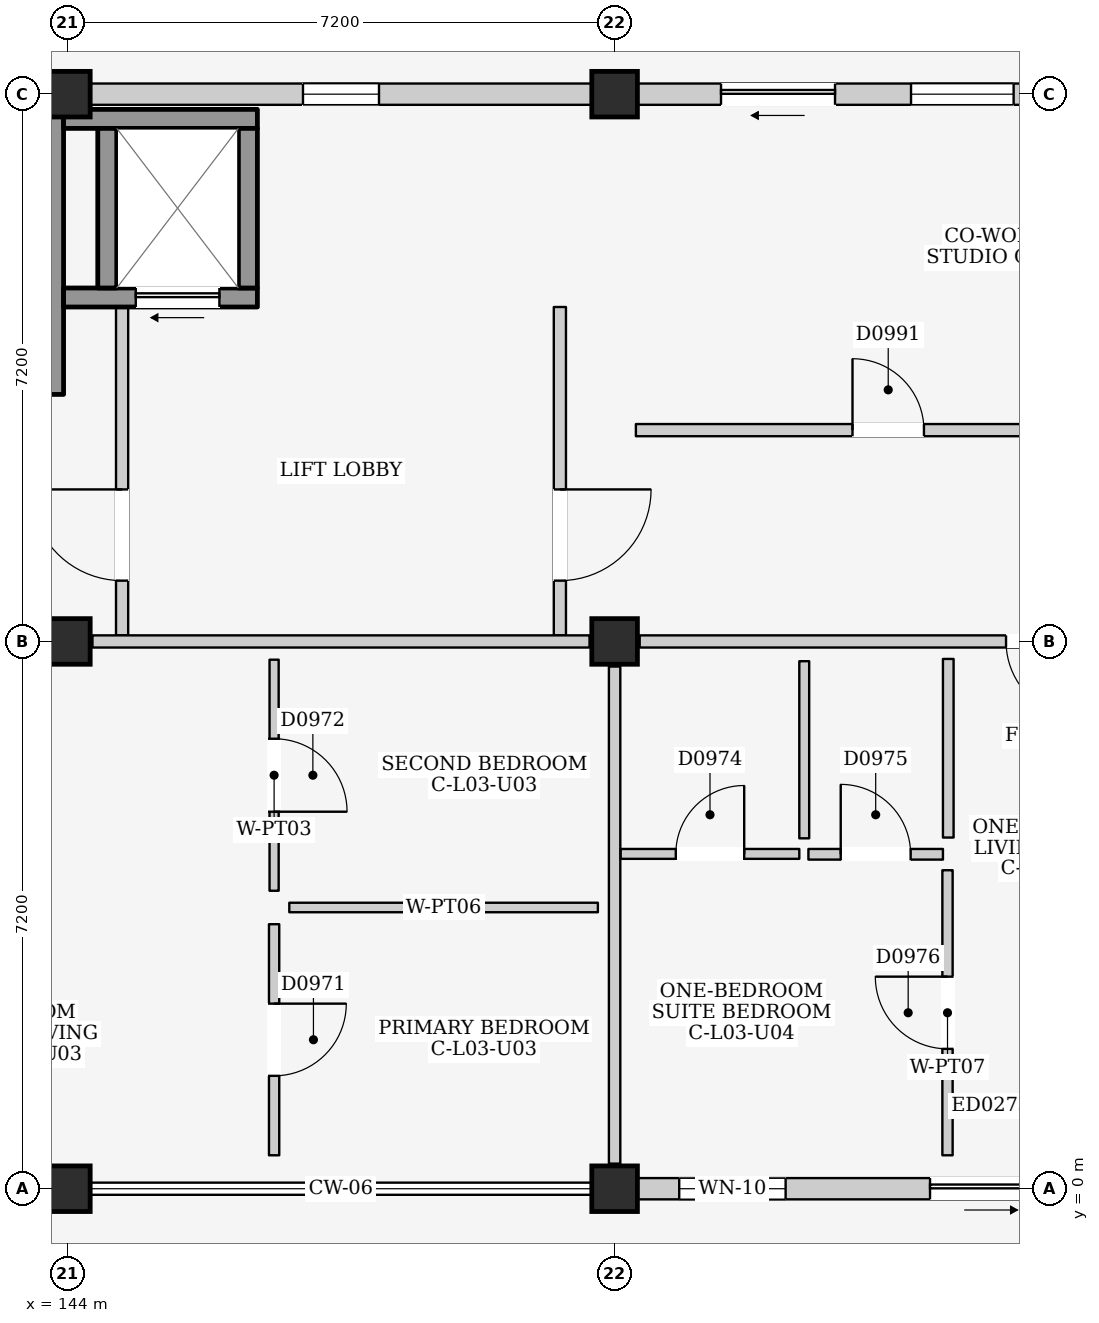
"""IFC4 building model, lengths in metres.
Left out: names, types, materials, properties, quantities, classifications, styles, units other than length and angle.
Written with IfcOpenShell. Run it as: python <this file> out.ifc"""

import sys

from ifc_helpers import new_model, si_unit, direction, frame, frame_2d, origin, origin_2d, place, context, subcontext, project, spatial, rectangle, extrude, element, fill, save


model = new_model("IFC4")
c1 = context("Model", 3, precision=1e-05, world=origin(), true_north=direction((0.0, 1.0)))
c2 = subcontext(c1, "Body", "Model", "MODEL_VIEW")
j1 = project(units=[si_unit("LENGTHUNIT", "METRE"), si_unit("PLANEANGLEUNIT", "RADIAN")], contexts=[c1])
p1 = place(None, origin())
s1 = spatial("IfcSite", under=j1, at=p1, CompositionType="ELEMENT")
p2 = place(p1, origin())
s2 = spatial("IfcBuilding", under=s1, at=p2, CompositionType="ELEMENT")
p3 = place(p2, frame((0.0, 0.0, 12.2)))
s3 = spatial("IfcBuildingStorey", under=s2, at=p3, CompositionType="ELEMENT", Elevation=12.2)
for number, where, z_axis, x_axis in (
    (1, (144.0, 0.0, 0.0), (0.0, 0.0, 1.0), (1.0, 0.0, 0.0)),
    (2, (144.0, 7.2, 0.0), (0.0, 0.0, 1.0), (1.0, 0.0, 0.0)),
    (3, (144.0, 14.4, 0.0), (0.0, 0.0, 1.0), (1.0, 0.0, 0.0)),
    (4, (151.2, 0.0, 0.0), (0.0, 0.0, 1.0), (1.0, 0.0, 0.0)),
    (5, (151.2, 7.2, 0.0), (0.0, 0.0, 1.0), (1.0, 0.0, 0.0)),
    (6, (151.2, 14.4, 0.0), (0.0, 0.0, 1.0), (1.0, 0.0, 0.0)),
):
    element("IfcColumn", number, at=place(p3, frame(where, z_axis=z_axis, x_axis=x_axis)), inside=s3, PredefinedType="COLUMN", context=c2, shape_type="SweptSolid", body=[
        extrude(rectangle(XDim=0.6, YDim=0.6, at=origin_2d()), origin(), (0.0, 0.0, 1.0), 3.2),
    ])
p4 = place(p3, frame((144.3, 14.4, 0.0), z_axis=(0.0, 0.0, 1.0), x_axis=(1.0, 0.0, 0.0)))
e7 = element("IfcWall", 7, at=p4, inside=s3, PredefinedType="ELEMENTEDWALL", context=c2, shape_type="SweptSolid", body=[
    extrude(rectangle(XDim=6.6, YDim=0.28, at=frame_2d((3.3, 0.0))), origin(), (0.0, 0.0, 1.0), 2.365),
])
p5 = place(p4, frame((2.8, 0.0, 1.2)))
e8 = element("IfcOpeningElement", 8, at=p5, cuts=e7, PredefinedType="OPENING", context=c2, shape_type="SweptSolid", body=[
    extrude(rectangle(XDim=1.0, YDim=0.9, at=frame_2d((0.5, 0.45))), frame((0.0, 0.155, 0.0), z_axis=(0.0, -1.0, 0.0), x_axis=(1.0, 0.0, 0.0)), (0.0, 0.0, 1.0), 0.31),
])
p6 = place(p3, frame((151.5, 0.0, 0.0), z_axis=(0.0, 0.0, 1.0), x_axis=(1.0, 0.0, 0.0)))
e9 = element("IfcWall", 9, at=p6, inside=s3, PredefinedType="ELEMENTEDWALL", context=c2, shape_type="SweptSolid", body=[
    extrude(rectangle(XDim=6.6, YDim=0.28, at=frame_2d((3.3, 0.0))), origin(), (0.0, 0.0, 1.0), 2.445),
])
p7 = place(p6, frame((3.85, 0.0, 0.0)))
e10 = element("IfcOpeningElement", 10, at=p7, cuts=e9, PredefinedType="OPENING", context=c2, shape_type="SweptSolid", body=[
    extrude(rectangle(XDim=1.6, YDim=2.12, at=frame_2d((0.8, 1.06))), frame((0.0, 0.155, 0.0), z_axis=(0.0, -1.0, 0.0), x_axis=(1.0, 0.0, 0.0)), (0.0, 0.0, 1.0), 0.31),
])
p8 = place(p6, frame((0.55, 0.0, 0.9)))
e11 = element("IfcOpeningElement", 11, at=p8, cuts=e9, PredefinedType="OPENING", context=c2, shape_type="SweptSolid", body=[
    extrude(rectangle(XDim=1.4, YDim=1.2, at=frame_2d((0.7, 0.6))), frame((0.0, 0.155, 0.0), z_axis=(0.0, -1.0, 0.0), x_axis=(1.0, 0.0, 0.0)), (0.0, 0.0, 1.0), 0.31),
])
p9 = place(p3, frame((151.5, 14.4, 0.0), z_axis=(0.0, 0.0, 1.0), x_axis=(1.0, 0.0, 0.0)))
e12 = element("IfcWall", 12, at=p9, inside=s3, PredefinedType="ELEMENTEDWALL", context=c2, shape_type="SweptSolid", body=[
    extrude(rectangle(XDim=6.6, YDim=0.28, at=frame_2d((3.3, 0.0))), origin(), (0.0, 0.0, 1.0), 2.365),
])
p10 = place(p9, frame((1.1, 0.0, 0.0)))
e13 = element("IfcOpeningElement", 13, at=p10, cuts=e12, PredefinedType="OPENING", context=c2, shape_type="SweptSolid", body=[
    extrude(rectangle(XDim=1.5, YDim=2.12, at=frame_2d((0.75, 1.06))), frame((0.0, 0.155, 0.0), z_axis=(0.0, -1.0, 0.0), x_axis=(1.0, 0.0, 0.0)), (0.0, 0.0, 1.0), 0.31),
])
p11 = place(p9, frame((3.6, 0.0, 0.755)))
e14 = element("IfcOpeningElement", 14, at=p11, cuts=e12, PredefinedType="OPENING", context=c2, shape_type="SweptSolid", body=[
    extrude(rectangle(XDim=1.35, YDim=1.5, at=frame_2d((0.675, 0.75))), frame((0.0, 0.155, 0.0), z_axis=(0.0, -1.0, 0.0), x_axis=(1.0, 0.0, 0.0)), (0.0, 0.0, 1.0), 0.31),
])
p12 = place(p3, frame((143.8, 10.45, 0.0), z_axis=(0.0, 0.0, 1.0), x_axis=(0.0, 1.0, 0.0)))
e15 = element("IfcWall", 15, at=p12, inside=s3, PredefinedType="SHEAR", context=c2, shape_type="SweptSolid", body=[
    extrude(rectangle(XDim=3.75, YDim=0.3, at=frame_2d((1.875, 0.0))), origin(), (0.0, 0.0, 1.0), 2.98),
])
p13 = place(p3, frame((144.72, 7.28, 0.0), z_axis=(0.0, 0.0, 1.0), x_axis=(0.0, 1.0, 0.0)))
e16 = element("IfcWall", 16, at=p13, inside=s3, PredefinedType="PARTITIONING", context=c2, shape_type="SweptSolid", body=[
    extrude(rectangle(XDim=4.32, YDim=0.16, at=frame_2d((2.16, 0.0))), origin(), (0.0, 0.0, 1.0), 2.98),
])
p14 = place(p13, frame((0.72, 0.0, 0.0)))
e17 = element("IfcOpeningElement", 17, at=p14, cuts=e16, PredefinedType="OPENING", context=c2, shape_type="SweptSolid", body=[
    extrude(rectangle(XDim=1.2, YDim=2.2, at=frame_2d((0.6, 1.1))), frame((0.0, 0.095, 0.0), z_axis=(0.0, -1.0, 0.0), x_axis=(1.0, 0.0, 0.0)), (0.0, 0.0, 1.0), 0.19),
])
p15 = place(p3, frame((150.48, 7.28, 0.0), z_axis=(0.0, 0.0, 1.0), x_axis=(0.0, 1.0, 0.0)))
e18 = element("IfcWall", 18, at=p15, inside=s3, PredefinedType="PARTITIONING", context=c2, shape_type="SweptSolid", body=[
    extrude(rectangle(XDim=4.32, YDim=0.16, at=frame_2d((2.16, 0.0))), origin(), (0.0, 0.0, 1.0), 2.98),
])
p16 = place(p15, frame((0.72, 0.0, 0.0)))
e19 = element("IfcOpeningElement", 19, at=p16, cuts=e18, PredefinedType="OPENING", context=c2, shape_type="SweptSolid", body=[
    extrude(rectangle(XDim=1.2, YDim=2.2, at=frame_2d((0.6, 1.1))), frame((0.0, 0.095, 0.0), z_axis=(0.0, -1.0, 0.0), x_axis=(1.0, 0.0, 0.0)), (0.0, 0.0, 1.0), 0.19),
])
p17 = place(p3, frame((143.95, 11.725, 0.0), z_axis=(0.0, 0.0, 1.0), x_axis=(1.0, 0.0, 0.0)))
e20 = element("IfcWall", 20, at=p17, inside=s3, PredefinedType="SHEAR", context=c2, shape_type="SweptSolid", body=[
    extrude(rectangle(XDim=2.55, YDim=0.25, at=frame_2d((1.275, 0.0))), origin(), (0.0, 0.0, 1.0), 2.98),
])
p18 = place(p17, frame((0.95, 0.0, 0.0)))
e21 = element("IfcOpeningElement", 21, at=p18, cuts=e20, PredefinedType="OPENING", context=c2, shape_type="SweptSolid", body=[
    extrude(rectangle(XDim=1.1, YDim=2.15, at=frame_2d((0.55, 1.075))), frame((0.0, 0.14, 0.0), z_axis=(0.0, -1.0, 0.0), x_axis=(1.0, 0.0, 0.0)), (0.0, 0.0, 1.0), 0.28),
])
p19 = place(p3, frame((143.95, 14.075, 0.0), z_axis=(0.0, 0.0, 1.0), x_axis=(1.0, 0.0, 0.0)))
e22 = element("IfcWall", 22, at=p19, inside=s3, PredefinedType="SHEAR", context=c2, shape_type="SweptSolid", body=[
    extrude(rectangle(XDim=2.55, YDim=0.25, at=frame_2d((1.275, 0.0))), origin(), (0.0, 0.0, 1.0), 2.98),
])
for number, where, z_axis, x_axis in (
    (23, (144.525, 11.85, 0.0), (0.0, 0.0, 1.0), (0.0, 1.0, 0.0)),
    (24, (146.375, 11.85, 0.0), (0.0, 0.0, 1.0), (0.0, 1.0, 0.0)),
):
    element("IfcWall", number, at=place(p3, frame(where, z_axis=z_axis, x_axis=x_axis)), inside=s3, PredefinedType="SHEAR", context=c2, shape_type="SweptSolid", body=[
        extrude(rectangle(XDim=2.1, YDim=0.25, at=frame_2d((1.05, 0.0))), origin(), (0.0, 0.0, 1.0), 2.98),
    ])
p20 = place(p3, frame((144.33, 7.2, 0.0), z_axis=(0.0, 0.0, 1.0), x_axis=(1.0, 0.0, 0.0)))
e25 = element("IfcWall", 25, at=p20, inside=s3, PredefinedType="PARTITIONING", context=c2, shape_type="SweptSolid", body=[
    extrude(rectangle(XDim=6.54, YDim=0.16, at=frame_2d((3.27, 0.0))), origin(), (0.0, 0.0, 1.0), 2.365),
])
p21 = place(p3, frame((151.2, 0.33, 0.0), z_axis=(0.0, 0.0, 1.0), x_axis=(0.0, 1.0, 0.0)))
e26 = element("IfcWall", 26, at=p21, inside=s3, PredefinedType="PARTITIONING", context=c2, shape_type="SweptSolid", body=[
    extrude(rectangle(XDim=6.54, YDim=0.15, at=frame_2d((3.27, 0.0))), origin(), (0.0, 0.0, 1.0), 2.415),
])
p22 = place(p3, frame((146.72, 0.44, 0.0), z_axis=(0.0, 0.0, 1.0), x_axis=(0.0, 1.0, 0.0)))
e27 = element("IfcWall", 27, at=p22, inside=s3, PredefinedType="PARTITIONING", context=c2, shape_type="SweptSolid", body=[
    extrude(rectangle(XDim=3.04, YDim=0.135, at=frame_2d((1.52, 0.0))), origin(), (0.0, 0.0, 1.0), 2.98),
])
p23 = place(p22, frame((1.045, 0.0, 0.0)))
e28 = element("IfcOpeningElement", 28, at=p23, cuts=e27, PredefinedType="OPENING", context=c2, shape_type="SweptSolid", body=[
    extrude(rectangle(XDim=0.95, YDim=2.15, at=frame_2d((0.475, 1.075))), frame((0.0, 0.083, 0.0), z_axis=(0.0, -1.0, 0.0), x_axis=(1.0, 0.0, 0.0)), (0.0, 0.0, 1.0), 0.165),
])
p24 = place(p3, frame((146.92, 3.7, 0.0), z_axis=(0.0, 0.0, 1.0), x_axis=(1.0, 0.0, 0.0)))
e29 = element("IfcWall", 29, at=p24, inside=s3, PredefinedType="PARTITIONING", context=c2, shape_type="SweptSolid", body=[
    extrude(rectangle(XDim=4.06, YDim=0.125, at=frame_2d((2.03, 0.0))), origin(), (0.0, 0.0, 1.0), 2.98),
])
p25 = place(p3, frame((146.72, 3.92, 0.0), z_axis=(0.0, 0.0, 1.0), x_axis=(0.0, 1.0, 0.0)))
e30 = element("IfcWall", 30, at=p25, inside=s3, PredefinedType="PARTITIONING", context=c2, shape_type="SweptSolid", body=[
    extrude(rectangle(XDim=3.04, YDim=0.12, at=frame_2d((1.52, 0.0))), origin(), (0.0, 0.0, 1.0), 2.98),
])
p26 = place(p25, frame((1.04, 0.0, 0.0)))
e31 = element("IfcOpeningElement", 31, at=p26, cuts=e30, PredefinedType="OPENING", context=c2, shape_type="SweptSolid", body=[
    extrude(rectangle(XDim=0.96, YDim=2.15, at=frame_2d((0.48, 1.075))), frame((0.0, 0.075, 0.0), z_axis=(0.0, -1.0, 0.0), x_axis=(1.0, 0.0, 0.0)), (0.0, 0.0, 1.0), 0.15),
])
p27 = place(p3, frame((151.53, 7.2, 0.0), z_axis=(0.0, 0.0, 1.0), x_axis=(1.0, 0.0, 0.0)))
e32 = element("IfcWall", 32, at=p27, inside=s3, PredefinedType="PARTITIONING", context=c2, shape_type="SweptSolid", body=[
    extrude(rectangle(XDim=6.54, YDim=0.16, at=frame_2d((3.27, 0.0))), origin(), (0.0, 0.0, 1.0), 2.365),
])
p28 = place(p27, frame((4.82, 0.0, 0.0)))
e33 = element("IfcOpeningElement", 33, at=p28, cuts=e32, PredefinedType="OPENING", context=c2, shape_type="SweptSolid", body=[
    extrude(rectangle(XDim=1.0, YDim=2.15, at=frame_2d((0.5, 1.075))), frame((0.0, 0.095, 0.0), z_axis=(0.0, -1.0, 0.0), x_axis=(1.0, 0.0, 0.0)), (0.0, 0.0, 1.0), 0.19),
])
p29 = place(p3, frame((151.28, 4.405, 0.0), z_axis=(0.0, 0.0, 1.0), x_axis=(1.0, 0.0, 0.0)))
e34 = element("IfcWall", 34, at=p29, inside=s3, PredefinedType="PARTITIONING", context=c2, shape_type="SweptSolid", body=[
    extrude(rectangle(XDim=2.35, YDim=0.13, at=frame_2d((1.175, 0.0))), origin(), (0.0, 0.0, 1.0), 2.98),
])
p30 = place(p29, frame((0.725, 0.0, 0.0)))
e35 = element("IfcOpeningElement", 35, at=p30, cuts=e34, PredefinedType="OPENING", context=c2, shape_type="SweptSolid", body=[
    extrude(rectangle(XDim=0.9, YDim=2.1, at=frame_2d((0.45, 1.05))), frame((0.0, 0.08, 0.0), z_axis=(0.0, -1.0, 0.0), x_axis=(1.0, 0.0, 0.0)), (0.0, 0.0, 1.0), 0.16),
])
p31 = place(p3, frame((153.695, 4.61, 0.0), z_axis=(0.0, 0.0, 1.0), x_axis=(0.0, 1.0, 0.0)))
e36 = element("IfcWall", 36, at=p31, inside=s3, PredefinedType="PARTITIONING", context=c2, shape_type="SweptSolid", body=[
    extrude(rectangle(XDim=2.33, YDim=0.13, at=frame_2d((1.165, 0.0))), origin(), (0.0, 0.0, 1.0), 2.98),
])
p32 = place(p3, frame((153.75, 4.4, 0.0), z_axis=(0.0, 0.0, 1.0), x_axis=(1.0, 0.0, 0.0)))
e37 = element("IfcWall", 37, at=p32, inside=s3, PredefinedType="PARTITIONING", context=c2, shape_type="SweptSolid", body=[
    extrude(rectangle(XDim=1.77, YDim=0.14, at=frame_2d((0.885, 0.0))), origin(), (0.0, 0.0, 1.0), 2.98),
])
p33 = place(p32, frame((0.425, 0.0, 0.0)))
e38 = element("IfcOpeningElement", 38, at=p33, cuts=e37, PredefinedType="OPENING", context=c2, shape_type="SweptSolid", body=[
    extrude(rectangle(XDim=0.92, YDim=2.1, at=frame_2d((0.46, 1.05))), frame((0.0, 0.085, 0.0), z_axis=(0.0, -1.0, 0.0), x_axis=(1.0, 0.0, 0.0)), (0.0, 0.0, 1.0), 0.17),
])
p34 = place(p3, frame((155.59, 4.62, 0.0), z_axis=(0.0, 0.0, 1.0), x_axis=(0.0, 1.0, 0.0)))
e39 = element("IfcWall", 39, at=p34, inside=s3, PredefinedType="PARTITIONING", context=c2, shape_type="SweptSolid", body=[
    extrude(rectangle(XDim=2.35, YDim=0.14, at=frame_2d((1.175, 0.0))), origin(), (0.0, 0.0, 1.0), 2.98),
])
p35 = place(p3, frame((155.58, 0.44, 0.0), z_axis=(0.0, 0.0, 1.0), x_axis=(0.0, 1.0, 0.0)))
e40 = element("IfcWall", 40, at=p35, inside=s3, PredefinedType="PARTITIONING", context=c2, shape_type="SweptSolid", body=[
    extrude(rectangle(XDim=3.75, YDim=0.135, at=frame_2d((1.875, 0.0))), origin(), (0.0, 0.0, 1.0), 2.98),
])
p36 = place(p35, frame((1.4, 0.0, 0.0)))
e41 = element("IfcOpeningElement", 41, at=p36, cuts=e40, PredefinedType="OPENING", context=c2, shape_type="SweptSolid", body=[
    extrude(rectangle(XDim=0.95, YDim=2.15, at=frame_2d((0.475, 1.075))), frame((0.0, 0.083, 0.0), z_axis=(0.0, -1.0, 0.0), x_axis=(1.0, 0.0, 0.0)), (0.0, 0.0, 1.0), 0.165),
])
p37 = place(p3, frame((151.48, 9.98, 0.0), z_axis=(0.0, 0.0, 1.0), x_axis=(1.0, 0.0, 0.0)))
e42 = element("IfcWall", 42, at=p37, inside=s3, PredefinedType="PARTITIONING", context=c2, shape_type="SweptSolid", body=[
    extrude(rectangle(XDim=6.64, YDim=0.16, at=frame_2d((3.32, 0.0))), origin(), (0.0, 0.0, 1.0), 2.98),
])
p38 = place(p37, frame((2.85, 0.0, 0.0)))
e43 = element("IfcOpeningElement", 43, at=p38, cuts=e42, PredefinedType="OPENING", context=c2, shape_type="SweptSolid", body=[
    extrude(rectangle(XDim=0.94, YDim=2.12, at=frame_2d((0.47, 1.06))), frame((0.0, 0.095, 0.0), z_axis=(0.0, -1.0, 0.0), x_axis=(1.0, 0.0, 0.0)), (0.0, 0.0, 1.0), 0.19),
])
p39 = place(p5, origin())
e44 = element("IfcWindow", 44, at=p39, inside=s3, PartitioningType="SINGLE_PANEL", PredefinedType="WINDOW", context=c2, shape_type="SweptSolid", body=[
    extrude(rectangle(XDim=1.0, YDim=0.9, at=frame_2d((0.5, 0.45))), frame((0.0, 0.03, 0.0), z_axis=(0.0, -1.0, 0.0), x_axis=(1.0, 0.0, 0.0)), (0.0, 0.0, 1.0), 0.06),
])
fill(e8, e44)
p40 = place(p7, frame((1.6, 0.0, 0.0), z_axis=(0.0, 0.0, 1.0), x_axis=(-1.0, 0.0, 0.0)))
e45 = element("IfcDoor", 45, at=p40, inside=s3, OperationType="SLIDING_TO_RIGHT", PredefinedType="DOOR", context=c2, shape_type="SweptSolid", body=[
    extrude(rectangle(XDim=1.6, YDim=2.12, at=frame_2d((0.8, 1.06))), frame((0.0, 0.025, 0.0), z_axis=(0.0, -1.0, 0.0), x_axis=(1.0, 0.0, 0.0)), (0.0, 0.0, 1.0), 0.05),
])
fill(e10, e45)
p41 = place(p8, origin())
e46 = element("IfcWindow", 46, at=p41, inside=s3, PartitioningType="DOUBLE_PANEL_HORIZONTAL", PredefinedType="WINDOW", context=c2, shape_type="SweptSolid", body=[
    extrude(rectangle(XDim=1.4, YDim=1.2, at=frame_2d((0.7, 0.6))), frame((0.0, 0.03, 0.0), z_axis=(0.0, -1.0, 0.0), x_axis=(1.0, 0.0, 0.0)), (0.0, 0.0, 1.0), 0.06),
])
fill(e11, e46)
p42 = place(p10, frame((1.5, 0.0, 0.0), z_axis=(0.0, 0.0, 1.0), x_axis=(-1.0, 0.0, 0.0)))
e47 = element("IfcDoor", 47, at=p42, inside=s3, OperationType="SLIDING_TO_LEFT", PredefinedType="DOOR", context=c2, shape_type="SweptSolid", body=[
    extrude(rectangle(XDim=1.5, YDim=2.12, at=frame_2d((0.75, 1.06))), frame((0.0, 0.025, 0.0), z_axis=(0.0, -1.0, 0.0), x_axis=(1.0, 0.0, 0.0)), (0.0, 0.0, 1.0), 0.05),
])
fill(e13, e47)
p43 = place(p11, origin())
e48 = element("IfcWindow", 48, at=p43, inside=s3, PartitioningType="SINGLE_PANEL", PredefinedType="WINDOW", context=c2, shape_type="SweptSolid", body=[
    extrude(rectangle(XDim=1.35, YDim=1.5, at=frame_2d((0.675, 0.75))), frame((0.0, 0.03, 0.0), z_axis=(0.0, -1.0, 0.0), x_axis=(1.0, 0.0, 0.0)), (0.0, 0.0, 1.0), 0.06),
])
fill(e14, e48)
p44 = place(p14, origin())
e49 = element("IfcDoor", 49, at=p44, inside=s3, OperationType="SINGLE_SWING_RIGHT", PredefinedType="DOOR", context=c2, shape_type="SweptSolid", body=[
    extrude(rectangle(XDim=1.2, YDim=2.2, at=frame_2d((0.6, 1.1))), frame((0.0, 0.025, 0.0), z_axis=(0.0, -1.0, 0.0), x_axis=(1.0, 0.0, 0.0)), (0.0, 0.0, 1.0), 0.05),
])
fill(e17, e49)
p45 = place(p16, frame((1.2, 0.0, 0.0), z_axis=(0.0, 0.0, 1.0), x_axis=(-1.0, 0.0, 0.0)))
e50 = element("IfcDoor", 50, at=p45, inside=s3, OperationType="SINGLE_SWING_LEFT", PredefinedType="DOOR", context=c2, shape_type="SweptSolid", body=[
    extrude(rectangle(XDim=1.2, YDim=2.2, at=frame_2d((0.6, 1.1))), frame((0.0, 0.025, 0.0), z_axis=(0.0, -1.0, 0.0), x_axis=(1.0, 0.0, 0.0)), (0.0, 0.0, 1.0), 0.05),
])
fill(e19, e50)
p46 = place(p18, frame((1.1, 0.0, 0.0), z_axis=(0.0, 0.0, 1.0), x_axis=(-1.0, 0.0, 0.0)))
e51 = element("IfcDoor", 51, at=p46, inside=s3, OperationType="SLIDING_TO_LEFT", PredefinedType="DOOR", context=c2, shape_type="SweptSolid", body=[
    extrude(rectangle(XDim=1.1, YDim=2.15, at=frame_2d((0.55, 1.075))), frame((0.0, 0.025, 0.0), z_axis=(0.0, -1.0, 0.0), x_axis=(1.0, 0.0, 0.0)), (0.0, 0.0, 1.0), 0.05),
])
fill(e21, e51)
p47 = place(p23, frame((0.95, 0.0, 0.0), z_axis=(0.0, 0.0, 1.0), x_axis=(-1.0, 0.0, 0.0)))
e52 = element("IfcDoor", 52, at=p47, inside=s3, OperationType="SINGLE_SWING_LEFT", PredefinedType="DOOR", context=c2, shape_type="SweptSolid", body=[
    extrude(rectangle(XDim=0.95, YDim=2.15, at=frame_2d((0.475, 1.075))), frame((0.0, 0.025, 0.0), z_axis=(0.0, -1.0, 0.0), x_axis=(1.0, 0.0, 0.0)), (0.0, 0.0, 1.0), 0.05),
])
fill(e28, e52)
p48 = place(p26, frame((0.96, 0.0, 0.0), z_axis=(0.0, 0.0, 1.0), x_axis=(-1.0, 0.0, 0.0)))
e53 = element("IfcDoor", 53, at=p48, inside=s3, OperationType="SINGLE_SWING_RIGHT", PredefinedType="DOOR", context=c2, shape_type="SweptSolid", body=[
    extrude(rectangle(XDim=0.96, YDim=2.15, at=frame_2d((0.48, 1.075))), frame((0.0, 0.025, 0.0), z_axis=(0.0, -1.0, 0.0), x_axis=(1.0, 0.0, 0.0)), (0.0, 0.0, 1.0), 0.05),
])
fill(e31, e53)
p49 = place(p28, frame((1.0, 0.0, 0.0), z_axis=(0.0, 0.0, 1.0), x_axis=(-1.0, 0.0, 0.0)))
e54 = element("IfcDoor", 54, at=p49, inside=s3, OperationType="SINGLE_SWING_LEFT", PredefinedType="DOOR", context=c2, shape_type="SweptSolid", body=[
    extrude(rectangle(XDim=1.0, YDim=2.15, at=frame_2d((0.5, 1.075))), frame((0.0, 0.025, 0.0), z_axis=(0.0, -1.0, 0.0), x_axis=(1.0, 0.0, 0.0)), (0.0, 0.0, 1.0), 0.05),
])
fill(e33, e54)
p50 = place(p30, origin())
e55 = element("IfcDoor", 55, at=p50, inside=s3, OperationType="SINGLE_SWING_RIGHT", PredefinedType="DOOR", context=c2, shape_type="SweptSolid", body=[
    extrude(rectangle(XDim=0.9, YDim=2.1, at=frame_2d((0.45, 1.05))), frame((0.0, 0.025, 0.0), z_axis=(0.0, -1.0, 0.0), x_axis=(1.0, 0.0, 0.0)), (0.0, 0.0, 1.0), 0.05),
])
fill(e35, e55)
p51 = place(p33, origin())
e56 = element("IfcDoor", 56, at=p51, inside=s3, OperationType="SINGLE_SWING_LEFT", PredefinedType="DOOR", context=c2, shape_type="SweptSolid", body=[
    extrude(rectangle(XDim=0.92, YDim=2.1, at=frame_2d((0.46, 1.05))), frame((0.0, 0.025, 0.0), z_axis=(0.0, -1.0, 0.0), x_axis=(1.0, 0.0, 0.0)), (0.0, 0.0, 1.0), 0.05),
])
fill(e38, e56)
p52 = place(p36, origin())
e57 = element("IfcDoor", 57, at=p52, inside=s3, OperationType="SINGLE_SWING_RIGHT", PredefinedType="DOOR", context=c2, shape_type="SweptSolid", body=[
    extrude(rectangle(XDim=0.95, YDim=2.15, at=frame_2d((0.475, 1.075))), frame((0.0, 0.025, 0.0), z_axis=(0.0, -1.0, 0.0), x_axis=(1.0, 0.0, 0.0)), (0.0, 0.0, 1.0), 0.05),
])
fill(e41, e57)
p53 = place(p38, origin())
e58 = element("IfcDoor", 58, at=p53, inside=s3, OperationType="SINGLE_SWING_LEFT", PredefinedType="DOOR", context=c2, shape_type="SweptSolid", body=[
    extrude(rectangle(XDim=0.94, YDim=2.12, at=frame_2d((0.47, 1.06))), frame((0.0, 0.025, 0.0), z_axis=(0.0, -1.0, 0.0), x_axis=(1.0, 0.0, 0.0)), (0.0, 0.0, 1.0), 0.05),
])
fill(e43, e58)
save(model, sys.argv[1])
